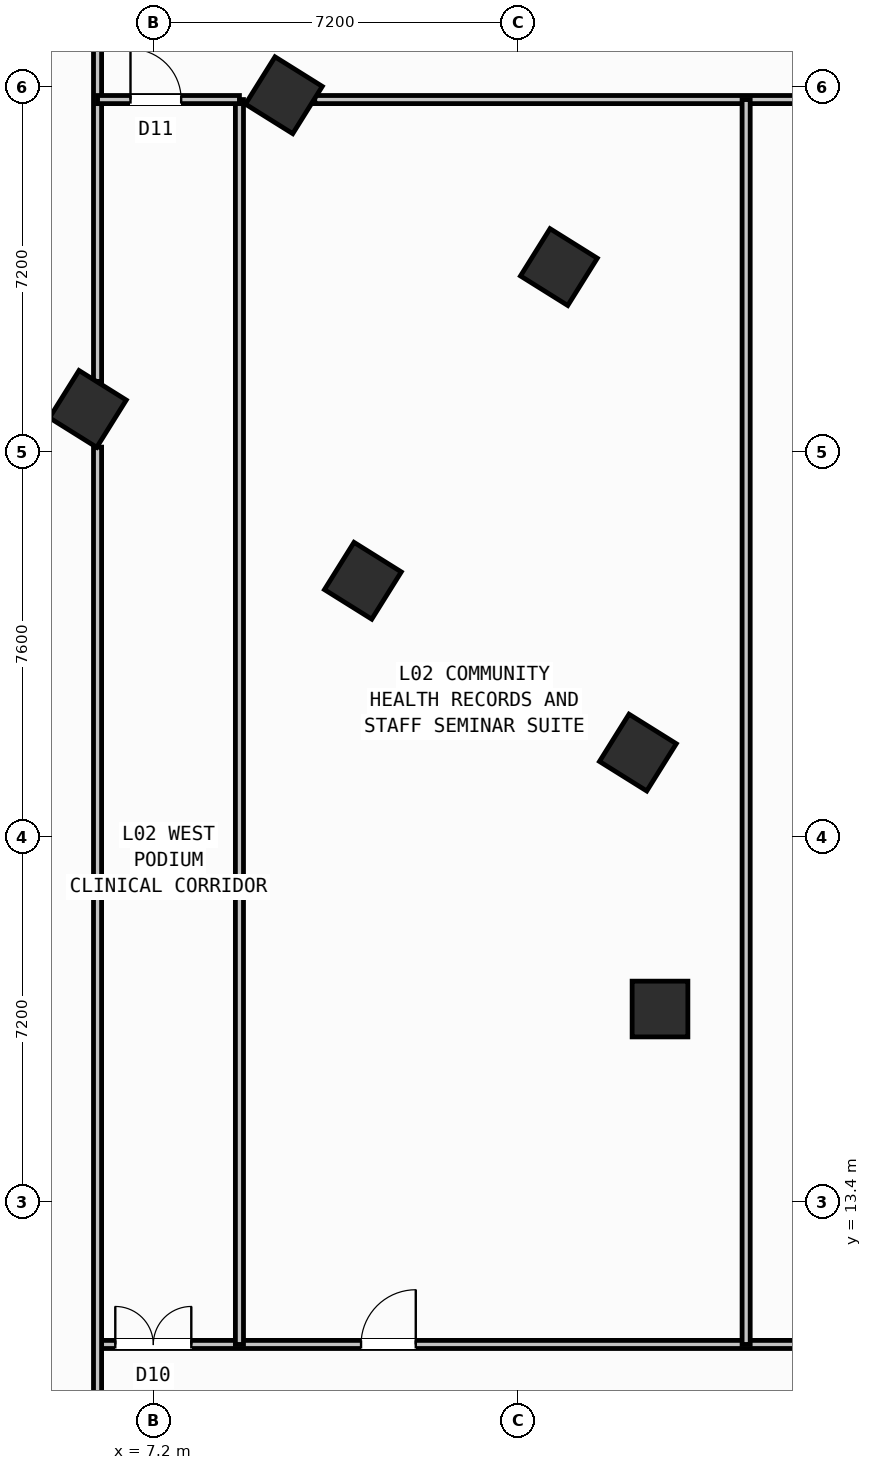
"""IFC4 building model, lengths in metres.
Left out: names, types, materials, properties, quantities, classifications, styles, units other than length and angle.
Written with IfcOpenShell. Run it as: python <this file> out.ifc"""

import sys

from ifc_helpers import new_model, si_unit, direction, frame, frame_2d, origin, origin_2d, place, context, subcontext, project, spatial, rectangle, hollow_rectangle, extrude, source, transform, mapped, element, fill, save


model = new_model("IFC4")
c1 = context("Model", 3, precision=1e-05, world=origin(), true_north=direction((0.0, 1.0)))
c2 = subcontext(c1, "Body", "Model", "MODEL_VIEW")
j1 = project(units=[si_unit("LENGTHUNIT", "METRE"), si_unit("PLANEANGLEUNIT", "RADIAN")], contexts=[c1])
p1 = place(None, origin())
s1 = spatial("IfcSite", under=j1, at=p1, CompositionType="ELEMENT")
p2 = place(p1, origin())
s2 = spatial("IfcBuilding", under=s1, at=p2, CompositionType="ELEMENT")
p3 = place(p2, frame((0.0, 0.0, 10.2)))
s3 = spatial("IfcBuildingStorey", under=s2, at=p3, CompositionType="ELEMENT", Elevation=10.2)
m1 = source(origin(), c2, "Body", "SweptSolid", [
    extrude(hollow_rectangle(XDim=1.1, YDim=1.1, WallThickness=0.04, at=origin_2d()), origin(), (0.0, 0.0, 1.0), 4.2),
])
for number, where, z_axis, x_axis in (
    (1, (17.2, 17.2, 0.0), (0.0, 0.0, 1.0), (1.0, 0.0, 0.0)),
    (2, (16.764, 22.261, 0.0), (0.0, 0.0, 1.0), (-0.848, 0.53, 0.0)),
    (3, (15.205, 31.844, 0.0), (0.0, 0.0, 1.0), (-0.848, 0.53, 0.0)),
    (4, (11.336, 25.653, 0.0), (0.0, 0.0, 1.0), (-0.848, 0.53, 0.0)),
    (5, (9.777, 35.235, 0.0), (0.0, 0.0, 1.0), (-0.848, 0.53, 0.0)),
    (6, (5.909, 29.044, 0.0), (0.0, 0.0, 1.0), (-0.848, 0.53, 0.0)),
):
    element("IfcColumn", number, at=place(p3, frame(where, z_axis=z_axis, x_axis=x_axis)), inside=s3, PredefinedType="COLUMN", context=c2, shape_type="MappedRepresentation", body=[
        mapped(m1, transform((0.0, 0.0, 0.0), scale=1.0)),
    ])
p4 = place(p3, frame((6.1, 10.58, 0.0), z_axis=(0.0, 0.0, 1.0), x_axis=(1.0, 0.0, 0.0)))
e7 = element("IfcWall", 7, at=p4, inside=s3, PredefinedType="PARTITIONING", context=c2, shape_type="SweptSolid", body=[
    extrude(rectangle(XDim=62.1, YDim=0.16, at=frame_2d((31.05, 0.0))), origin(), (0.0, 0.0, 1.0), 3.84),
])
p5 = place(p4, frame((29.0, 0.0, 0.0)))
e8 = element("IfcOpeningElement", 8, at=p5, cuts=e7, PredefinedType="OPENING", context=c2, shape_type="SweptSolid", body=[
    extrude(rectangle(XDim=1.7, YDim=2.2, at=frame_2d((0.85, 1.1))), frame((0.0, 0.09, 0.0), z_axis=(0.0, -1.0, 0.0), x_axis=(1.0, 0.0, 0.0)), (0.0, 0.0, 1.0), 0.18),
])
p6 = place(p4, frame((0.35, 0.0, 0.0)))
e9 = element("IfcOpeningElement", 9, at=p6, cuts=e7, PredefinedType="OPENING", context=c2, shape_type="SweptSolid", body=[
    extrude(rectangle(XDim=1.5, YDim=2.15, at=frame_2d((0.75, 1.075))), frame((0.0, 0.09, 0.0), z_axis=(0.0, -1.0, 0.0), x_axis=(1.0, 0.0, 0.0)), (0.0, 0.0, 1.0), 0.18),
])
p7 = place(p4, frame((5.2, 0.0, 0.0)))
e10 = element("IfcOpeningElement", 10, at=p7, cuts=e7, PredefinedType="OPENING", context=c2, shape_type="SweptSolid", body=[
    extrude(rectangle(XDim=1.08, YDim=2.15, at=frame_2d((0.54, 1.075))), frame((0.0, 0.09, 0.0), z_axis=(0.0, -1.0, 0.0), x_axis=(1.0, 0.0, 0.0)), (0.0, 0.0, 1.0), 0.18),
])
p8 = place(p4, frame((58.5, 0.0, 0.0)))
e11 = element("IfcOpeningElement", 11, at=p8, cuts=e7, PredefinedType="OPENING", context=c2, shape_type="SweptSolid", body=[
    extrude(rectangle(XDim=1.08, YDim=2.15, at=frame_2d((0.54, 1.075))), frame((0.0, 0.09, 0.0), z_axis=(0.0, -1.0, 0.0), x_axis=(1.0, 0.0, 0.0)), (0.0, 0.0, 1.0), 0.18),
])
p9 = place(p3, frame((6.1, 7.62, 0.0), z_axis=(0.0, 0.0, 1.0), x_axis=(0.0, 1.0, 0.0)))
e12 = element("IfcWall", 12, at=p9, inside=s3, PredefinedType="PARTITIONING", context=c2, shape_type="SweptSolid", body=[
    extrude(rectangle(XDim=20.67, YDim=0.16, at=frame_2d((10.335, 0.0))), origin(), (0.0, 0.0, 1.0), 3.84),
])
p10 = place(p3, frame((6.1, 29.587, 0.0), z_axis=(0.0, 0.0, 1.0), x_axis=(0.0, 1.0, 0.0)))
e13 = element("IfcWall", 13, at=p10, inside=s3, PredefinedType="PARTITIONING", context=c2, shape_type="SweptSolid", body=[
    extrude(rectangle(XDim=9.413, YDim=0.16, at=frame_2d((4.706, 0.0))), origin(), (0.0, 0.0, 1.0), 3.84),
])
p11 = place(p3, frame((8.9, 10.58, 0.0), z_axis=(0.0, 0.0, 1.0), x_axis=(0.0, 1.0, 0.0)))
e14 = element("IfcWall", 14, at=p11, inside=s3, PredefinedType="PARTITIONING", context=c2, shape_type="SweptSolid", body=[
    extrude(rectangle(XDim=24.57, YDim=0.16, at=frame_2d((12.285, 0.0))), origin(), (0.0, 0.0, 1.0), 3.84),
])
p12 = place(p3, frame((10.386, 35.15, 0.0), z_axis=(0.0, 0.0, 1.0), x_axis=(1.0, 0.0, 0.0)))
e15 = element("IfcWall", 15, at=p12, inside=s3, PredefinedType="PARTITIONING", context=c2, shape_type="SweptSolid", body=[
    extrude(rectangle(XDim=13.768, YDim=0.16, at=frame_2d((6.884, 0.0))), origin(), (0.0, 0.0, 1.0), 3.84),
])
p13 = place(p3, frame((6.1, 35.15, 0.0), z_axis=(0.0, 0.0, 1.0), x_axis=(1.0, 0.0, 0.0)))
e16 = element("IfcWall", 16, at=p13, inside=s3, PredefinedType="PARTITIONING", context=c2, shape_type="SweptSolid", body=[
    extrude(rectangle(XDim=2.8, YDim=0.16, at=frame_2d((1.4, 0.0))), origin(), (0.0, 0.0, 1.0), 3.84),
])
p14 = place(p13, frame((0.65, 0.0, 0.0)))
e17 = element("IfcOpeningElement", 17, at=p14, cuts=e16, PredefinedType="OPENING", context=c2, shape_type="SweptSolid", body=[
    extrude(rectangle(XDim=1.0, YDim=2.1, at=frame_2d((0.5, 1.05))), frame((0.0, 0.09, 0.0), z_axis=(0.0, -1.0, 0.0), x_axis=(1.0, 0.0, 0.0)), (0.0, 0.0, 1.0), 0.18),
])
p15 = place(p3, frame((18.9, 10.58, 0.0), z_axis=(0.0, 0.0, 1.0), x_axis=(0.0, 1.0, 0.0)))
e18 = element("IfcWall", 18, at=p15, inside=s3, PredefinedType="PARTITIONING", context=c2, shape_type="SweptSolid", body=[
    extrude(rectangle(XDim=24.57, YDim=0.16, at=frame_2d((12.285, 0.0))), origin(), (0.0, 0.0, 1.0), 3.84),
])
m2 = source(origin(), c2, "Body", "SweptSolid", [
    extrude(rectangle(XDim=1.5, YDim=2.15, at=frame_2d((0.75, 1.075))), frame((0.0, 0.025, 0.0), z_axis=(0.0, -1.0, 0.0), x_axis=(1.0, 0.0, 0.0)), (0.0, 0.0, 1.0), 0.05),
])
p16 = place(p6, origin())
e19 = element("IfcDoor", 19, at=p16, inside=s3, OperationType="DOUBLE_DOOR_SINGLE_SWING", PredefinedType="DOOR", context=c2, shape_type="MappedRepresentation", body=[
    mapped(m2, transform((0.0, 0.0, 0.0), scale=1.0)),
])
fill(e9, e19)
m3 = source(origin(), c2, "Body", "SweptSolid", [
    extrude(rectangle(XDim=1.0, YDim=2.1, at=frame_2d((0.5, 1.05))), frame((0.0, 0.025, 0.0), z_axis=(0.0, -1.0, 0.0), x_axis=(1.0, 0.0, 0.0)), (0.0, 0.0, 1.0), 0.05),
])
p17 = place(p14, origin())
e20 = element("IfcDoor", 20, at=p17, inside=s3, OperationType="SINGLE_SWING_LEFT", PredefinedType="DOOR", context=c2, shape_type="MappedRepresentation", body=[
    mapped(m3, transform((0.0, 0.0, 0.0), scale=1.0)),
])
fill(e17, e20)
m4 = source(origin(), c2, "Body", "SweptSolid", [
    extrude(rectangle(XDim=1.08, YDim=2.15, at=frame_2d((0.54, 1.075))), frame((0.0, 0.025, 0.0), z_axis=(0.0, -1.0, 0.0), x_axis=(1.0, 0.0, 0.0)), (0.0, 0.0, 1.0), 0.05),
])
p18 = place(p7, origin())
e21 = element("IfcDoor", 21, at=p18, inside=s3, OperationType="SINGLE_SWING_RIGHT", PredefinedType="DOOR", context=c2, shape_type="MappedRepresentation", body=[
    mapped(m4, transform((0.0, 0.0, 0.0), scale=1.0)),
])
fill(e10, e21)
save(model, sys.argv[1])
